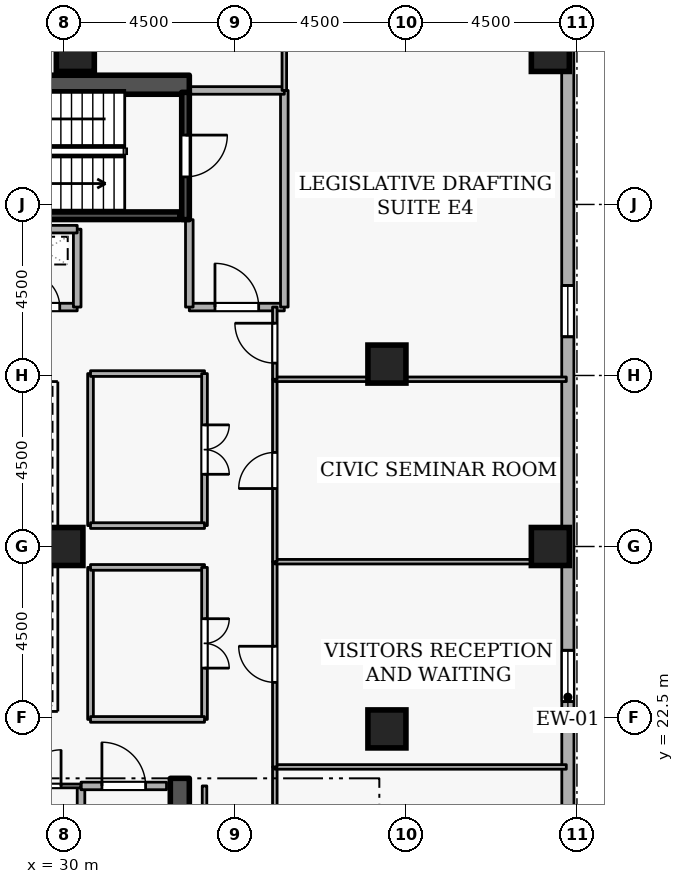
"""IFC4 building model, lengths in metres.
Left out: names, types, materials, properties, quantities, classifications, styles, units other than length and angle.
Written with IfcOpenShell. Run it as: python <this file> out.ifc"""

import sys

from ifc_helpers import new_model, si_unit, direction, frame, frame_2d, origin, origin_2d, place, context, subcontext, project, spatial, rectangle, extrude, element, fill, save


model = new_model("IFC4")
c1 = context("Model", 3, precision=1e-05, world=origin(), true_north=direction((0.0, 1.0)))
c2 = subcontext(c1, "Body", "Model", "MODEL_VIEW")
j1 = project(units=[si_unit("LENGTHUNIT", "METRE"), si_unit("PLANEANGLEUNIT", "RADIAN")], contexts=[c1])
p1 = place(None, origin())
s1 = spatial("IfcSite", under=j1, at=p1, CompositionType="ELEMENT")
p2 = place(p1, origin())
s2 = spatial("IfcBuilding", under=s1, at=p2, CompositionType="ELEMENT")
p3 = place(p2, frame((0.0, 0.0, 251.1)))
s3 = spatial("IfcBuildingStorey", under=s2, at=p3, CompositionType="ELEMENT", Elevation=251.1)
p4 = place(p3, frame((33.05, 15.1, 0.0), z_axis=(0.0, 0.0, 1.0), x_axis=(0.0, 1.0, 0.0)))
e1 = element("IfcWall", 1, at=p4, inside=s3, PredefinedType="SHEAR", context=c2, shape_type="SweptSolid", body=[
    extrude(rectangle(XDim=5.8, YDim=0.5, at=frame_2d((2.9, 0.0))), origin(), (0.0, 0.0, 1.0), 3.6),
])
p5 = place(p3, frame((17.7, 39.15, 0.0), z_axis=(0.0, 0.0, 1.0), x_axis=(1.0, 0.0, 0.0)))
e2 = element("IfcWall", 2, at=p5, inside=s3, PredefinedType="SHEAR", context=c2, shape_type="SweptSolid", body=[
    extrude(rectangle(XDim=15.6, YDim=0.5, at=frame_2d((7.8, 0.0))), origin(), (0.0, 0.0, 1.0), 3.6),
])
for number, where, z_axis, x_axis in (
    (3, (42.8, 27.0, 0.0), (0.0, 0.0, 1.0), (1.0, 0.0, 0.0)),
    (4, (42.8, 40.0, 0.0), (0.0, 0.0, 1.0), (1.0, 0.0, 0.0)),
    (5, (38.5, 22.2, 0.0), (0.0, 0.0, 1.0), (1.0, 0.0, 0.0)),
    (6, (38.5, 31.8, 0.0), (0.0, 0.0, 1.0), (1.0, 0.0, 0.0)),
    (7, (30.3, 40.0, 0.0), (0.0, 0.0, 1.0), (1.0, 0.0, 0.0)),
    (8, (30.0, 27.0, 0.0), (0.0, 0.0, 1.0), (1.0, 0.0, 0.0)),
):
    element("IfcColumn", number, at=place(p3, frame(where, z_axis=z_axis, x_axis=x_axis)), inside=s3, PredefinedType="COLUMN", context=c2, shape_type="SweptSolid", body=[
        extrude(rectangle(XDim=1.0, YDim=1.0, at=origin_2d()), origin(), (0.0, 0.0, 1.0), 3.6),
    ])
p6 = place(p3, frame((43.265, 5.819, 0.0), z_axis=(0.0, 0.0, 1.0), x_axis=(-0.000184351399, 0.999999983007, 0.0)))
e9 = element("IfcWall", 9, at=p6, inside=s3, PredefinedType="STANDARD", context=c2, shape_type="SweptSolid", body=[
    extrude(rectangle(XDim=34.432, YDim=0.32, at=frame_2d((17.216, 0.0))), origin(), (0.0, 0.0, 1.0), 2.22),
])
p7 = place(p6, frame((2.7, 0.0, 0.72)))
e10 = element("IfcOpeningElement", 10, at=p7, cuts=e9, PredefinedType="OPENING", context=c2, shape_type="SweptSolid", body=[
    extrude(rectangle(XDim=1.35, YDim=1.05, at=frame_2d((0.675, 0.525))), frame((0.0, 0.17, 0.0), z_axis=(0.0, -1.0, 0.0), x_axis=(1.0, 0.0, 0.0)), (0.0, 0.0, 1.0), 0.34),
])
p8 = place(p6, frame((12.3, 0.0, 0.72)))
e11 = element("IfcOpeningElement", 11, at=p8, cuts=e9, PredefinedType="OPENING", context=c2, shape_type="SweptSolid", body=[
    extrude(rectangle(XDim=1.35, YDim=1.05, at=frame_2d((0.675, 0.525))), frame((0.0, 0.17, 0.0), z_axis=(0.0, -1.0, 0.0), x_axis=(1.0, 0.0, 0.0)), (0.0, 0.0, 1.0), 0.34),
])
p9 = place(p6, frame((17.1, 0.0, 0.72)))
e12 = element("IfcOpeningElement", 12, at=p9, cuts=e9, PredefinedType="OPENING", context=c2, shape_type="SweptSolid", body=[
    extrude(rectangle(XDim=1.35, YDim=1.05, at=frame_2d((0.675, 0.525))), frame((0.0, 0.17, 0.0), z_axis=(0.0, -1.0, 0.0), x_axis=(1.0, 0.0, 0.0)), (0.0, 0.0, 1.0), 0.34),
])
p10 = place(p6, frame((26.7, 0.0, 0.72)))
e13 = element("IfcOpeningElement", 13, at=p10, cuts=e9, PredefinedType="OPENING", context=c2, shape_type="SweptSolid", body=[
    extrude(rectangle(XDim=1.35, YDim=1.05, at=frame_2d((0.675, 0.525))), frame((0.0, 0.17, 0.0), z_axis=(0.0, -1.0, 0.0), x_axis=(1.0, 0.0, 0.0)), (0.0, 0.0, 1.0), 0.34),
])
p11 = place(p3, frame((33.2, 38.95, 0.0), z_axis=(0.0, 0.0, 1.0), x_axis=(0.0, -1.0, 0.0)))
e14 = element("IfcWall", 14, at=p11, inside=s3, PredefinedType="SHEAR", context=c2, shape_type="SweptSolid", body=[
    extrude(rectangle(XDim=3.35, YDim=0.2, at=frame_2d((1.675, 0.0))), origin(), (0.0, 0.0, 1.0), 3.6),
])
p12 = place(p11, frame((1.125, 0.0, 0.0)))
e15 = element("IfcOpeningElement", 15, at=p12, cuts=e14, PredefinedType="OPENING", context=c2, shape_type="SweptSolid", body=[
    extrude(rectangle(XDim=1.1, YDim=2.1, at=frame_2d((0.55, 1.05))), frame((0.0, 0.11, 0.0), z_axis=(0.0, -1.0, 0.0), x_axis=(1.0, 0.0, 0.0)), (0.0, 0.0, 1.0), 0.22),
])
p13 = place(p3, frame((25.95, 35.703, 0.0), z_axis=(0.0, 0.0, 1.0), x_axis=(1.0, 0.0, 0.0)))
e16 = element("IfcWall", 16, at=p13, inside=s3, PredefinedType="SHEAR", context=c2, shape_type="SweptSolid", body=[
    extrude(rectangle(XDim=7.1, YDim=0.2, at=frame_2d((3.55, 0.0))), origin(), (0.0, 0.0, 1.0), 3.6),
])
p14 = place(p3, frame((33.3, 33.3, 0.0), z_axis=(0.0, 0.0, 1.0), x_axis=(1.0, 0.0, 0.0)))
e17 = element("IfcWall", 17, at=p14, inside=s3, PredefinedType="STANDARD", context=c2, shape_type="SweptSolid", body=[
    extrude(rectangle(XDim=2.5, YDim=0.2, at=frame_2d((1.25, 0.0))), origin(), (0.0, 0.0, 1.0), 3.32),
])
p15 = place(p14, frame((0.675, 0.0, 0.0)))
e18 = element("IfcOpeningElement", 18, at=p15, cuts=e17, PredefinedType="OPENING", context=c2, shape_type="SweptSolid", body=[
    extrude(rectangle(XDim=1.15, YDim=2.1, at=frame_2d((0.575, 1.05))), frame((0.0, 0.11, 0.0), z_axis=(0.0, -1.0, 0.0), x_axis=(1.0, 0.0, 0.0)), (0.0, 0.0, 1.0), 0.22),
])
p16 = place(p3, frame((35.8, 33.3, 0.0), z_axis=(0.0, 0.0, 1.0), x_axis=(0.0, 1.0, 0.0)))
e19 = element("IfcWall", 19, at=p16, inside=s3, PredefinedType="STANDARD", context=c2, shape_type="SweptSolid", body=[
    extrude(rectangle(XDim=5.7, YDim=0.2, at=frame_2d((2.85, 0.0))), origin(), (0.0, 0.0, 1.0), 3.32),
])
p17 = place(p3, frame((35.8, 39.0, 0.0), z_axis=(0.0, 0.0, 1.0), x_axis=(-1.0, 0.0, 0.0)))
e20 = element("IfcWall", 20, at=p17, inside=s3, PredefinedType="STANDARD", context=c2, shape_type="SweptSolid", body=[
    extrude(rectangle(XDim=2.5, YDim=0.2, at=frame_2d((1.25, 0.0))), origin(), (0.0, 0.0, 1.0), 3.32),
])
p18 = place(p3, frame((33.3, 35.6, 0.0), z_axis=(0.0, 0.0, 1.0), x_axis=(0.0, -1.0, 0.0)))
e21 = element("IfcWall", 21, at=p18, inside=s3, PredefinedType="STANDARD", context=c2, shape_type="SweptSolid", body=[
    extrude(rectangle(XDim=2.3, YDim=0.2, at=frame_2d((1.15, 0.0))), origin(), (0.0, 0.0, 1.0), 2.525),
])
p19 = place(p3, frame((28.55, 33.3, 0.0), z_axis=(0.0, 0.0, 1.0), x_axis=(1.0, 0.0, 0.0)))
e22 = element("IfcWall", 22, at=p19, inside=s3, PredefinedType="STANDARD", context=c2, shape_type="SweptSolid", body=[
    extrude(rectangle(XDim=1.8, YDim=0.2, at=frame_2d((0.9, 0.0))), origin(), (0.0, 0.0, 1.0), 3.32),
])
p20 = place(p19, frame((0.46, 0.0, 0.0)))
e23 = element("IfcOpeningElement", 23, at=p20, cuts=e22, PredefinedType="OPENING", context=c2, shape_type="SweptSolid", body=[
    extrude(rectangle(XDim=0.88, YDim=2.04, at=frame_2d((0.44, 1.02))), frame((0.0, 0.11, 0.0), z_axis=(0.0, -1.0, 0.0), x_axis=(1.0, 0.0, 0.0)), (0.0, 0.0, 1.0), 0.22),
])
p21 = place(p3, frame((30.35, 33.3, 0.0), z_axis=(0.0, 0.0, 1.0), x_axis=(0.0, 1.0, 0.0)))
e24 = element("IfcWall", 24, at=p21, inside=s3, PredefinedType="STANDARD", context=c2, shape_type="SweptSolid", body=[
    extrude(rectangle(XDim=2.05, YDim=0.2, at=frame_2d((1.025, 0.0))), origin(), (0.0, 0.0, 1.0), 3.32),
])
p22 = place(p3, frame((30.35, 35.35, 0.0), z_axis=(0.0, 0.0, 1.0), x_axis=(-1.0, 0.0, 0.0)))
e25 = element("IfcWall", 25, at=p22, inside=s3, PredefinedType="STANDARD", context=c2, shape_type="SweptSolid", body=[
    extrude(rectangle(XDim=1.8, YDim=0.2, at=frame_2d((0.9, 0.0))), origin(), (0.0, 0.0, 1.0), 3.32),
])
p23 = place(p3, frame((30.45, 18.65, 0.0), z_axis=(0.0, 0.0, 1.0), x_axis=(0.0, 1.0, 0.0)))
e26 = element("IfcWall", 26, at=p23, inside=s3, PredefinedType="STANDARD", context=c2, shape_type="SweptSolid", body=[
    extrude(rectangle(XDim=2.05, YDim=0.2, at=frame_2d((1.025, 0.0))), origin(), (0.0, 0.0, 1.0), 3.32),
])
p24 = place(p3, frame((30.45, 20.7, 0.0), z_axis=(0.0, 0.0, 1.0), x_axis=(1.0, 0.0, 0.0)))
e27 = element("IfcWall", 27, at=p24, inside=s3, PredefinedType="STANDARD", context=c2, shape_type="SweptSolid", body=[
    extrude(rectangle(XDim=2.25, YDim=0.2, at=frame_2d((1.125, 0.0))), origin(), (0.0, 0.0, 1.0), 3.32),
])
p25 = place(p24, frame((0.55, 0.0, 0.0)))
e28 = element("IfcOpeningElement", 28, at=p25, cuts=e27, PredefinedType="OPENING", context=c2, shape_type="SweptSolid", body=[
    extrude(rectangle(XDim=1.15, YDim=2.1, at=frame_2d((0.575, 1.05))), frame((0.0, 0.11, 0.0), z_axis=(0.0, -1.0, 0.0), x_axis=(1.0, 0.0, 0.0)), (0.0, 0.0, 1.0), 0.22),
])
p26 = place(p3, frame((28.45, 20.7, 0.0), z_axis=(0.0, 0.0, 1.0), x_axis=(1.0, 0.0, 0.0)))
e29 = element("IfcWall", 29, at=p26, inside=s3, PredefinedType="PARTITIONING", context=c2, shape_type="SweptSolid", body=[
    extrude(rectangle(XDim=2.0, YDim=0.1, at=frame_2d((1.0, 0.0))), origin(), (0.0, 0.0, 1.0), 3.32),
])
p27 = place(p26, frame((0.525, 0.0, 0.0)))
e30 = element("IfcOpeningElement", 30, at=p27, cuts=e29, PredefinedType="OPENING", context=c2, shape_type="SweptSolid", body=[
    extrude(rectangle(XDim=0.95, YDim=2.1, at=frame_2d((0.475, 1.05))), frame((0.0, 0.06, 0.0), z_axis=(0.0, -1.0, 0.0), x_axis=(1.0, 0.0, 0.0)), (0.0, 0.0, 1.0), 0.12),
])
p28 = place(p3, frame((33.7, 20.7, 0.0), z_axis=(0.0, 0.0, 1.0), x_axis=(0.0, -1.0, 0.0)))
e31 = element("IfcWall", 31, at=p28, inside=s3, PredefinedType="PARTITIONING", context=c2, shape_type="SweptSolid", body=[
    extrude(rectangle(XDim=5.9, YDim=0.12, at=frame_2d((2.95, 0.0))), origin(), (0.0, 0.0, 1.0), 3.32),
])
p29 = place(p3, frame((35.55, 14.8, 0.0), z_axis=(0.0, 0.0, 1.0), x_axis=(0.0, 1.0, 0.0)))
e32 = element("IfcWall", 32, at=p29, inside=s3, PredefinedType="PARTITIONING", context=c2, shape_type="SweptSolid", body=[
    extrude(rectangle(XDim=6.4, YDim=0.12, at=frame_2d((3.2, 0.0))), origin(), (0.0, 0.0, 1.0), 3.32),
])
p30 = place(p29, frame((2.675, 0.0, 0.0)))
e33 = element("IfcOpeningElement", 33, at=p30, cuts=e32, PredefinedType="OPENING", context=c2, shape_type="SweptSolid", body=[
    extrude(rectangle(XDim=1.05, YDim=2.1, at=frame_2d((0.525, 1.05))), frame((0.0, 0.07, 0.0), z_axis=(0.0, -1.0, 0.0), x_axis=(1.0, 0.0, 0.0)), (0.0, 0.0, 1.0), 0.14),
])
p31 = place(p3, frame((35.55, 21.2, 0.0), z_axis=(0.0, 0.0, 1.0), x_axis=(1.0, 0.0, 0.0)))
e34 = element("IfcWall", 34, at=p31, inside=s3, PredefinedType="PARTITIONING", context=c2, shape_type="SweptSolid", body=[
    extrude(rectangle(XDim=7.67, YDim=0.12, at=frame_2d((3.835, 0.0))), origin(), (0.0, 0.0, 1.0), 3.32),
])
p32 = place(p3, frame((35.55, 21.2, 0.0), z_axis=(0.0, 0.0, 1.0), x_axis=(0.0, 1.0, 0.0)))
e35 = element("IfcWall", 35, at=p32, inside=s3, PredefinedType="PARTITIONING", context=c2, shape_type="SweptSolid", body=[
    extrude(rectangle(XDim=5.4, YDim=0.12, at=frame_2d((2.7, 0.0))), origin(), (0.0, 0.0, 1.0), 3.32),
])
p33 = place(p32, frame((2.225, 0.0, 0.0)))
e36 = element("IfcOpeningElement", 36, at=p33, cuts=e35, PredefinedType="OPENING", context=c2, shape_type="SweptSolid", body=[
    extrude(rectangle(XDim=0.95, YDim=2.1, at=frame_2d((0.475, 1.05))), frame((0.0, 0.07, 0.0), z_axis=(0.0, -1.0, 0.0), x_axis=(1.0, 0.0, 0.0)), (0.0, 0.0, 1.0), 0.14),
])
p34 = place(p3, frame((35.55, 26.6, 0.0), z_axis=(0.0, 0.0, 1.0), x_axis=(1.0, 0.0, 0.0)))
e37 = element("IfcWall", 37, at=p34, inside=s3, PredefinedType="PARTITIONING", context=c2, shape_type="SweptSolid", body=[
    extrude(rectangle(XDim=7.67, YDim=0.12, at=frame_2d((3.835, 0.0))), origin(), (0.0, 0.0, 1.0), 1.785),
])
p35 = place(p3, frame((35.55, 26.6, 0.0), z_axis=(0.0, 0.0, 1.0), x_axis=(0.0, 1.0, 0.0)))
e38 = element("IfcWall", 38, at=p35, inside=s3, PredefinedType="PARTITIONING", context=c2, shape_type="SweptSolid", body=[
    extrude(rectangle(XDim=4.8, YDim=0.12, at=frame_2d((2.4, 0.0))), origin(), (0.0, 0.0, 1.0), 3.32),
])
p36 = place(p35, frame((1.925, 0.0, 0.0)))
e39 = element("IfcOpeningElement", 39, at=p36, cuts=e38, PredefinedType="OPENING", context=c2, shape_type="SweptSolid", body=[
    extrude(rectangle(XDim=0.95, YDim=2.1, at=frame_2d((0.475, 1.05))), frame((0.0, 0.07, 0.0), z_axis=(0.0, -1.0, 0.0), x_axis=(1.0, 0.0, 0.0)), (0.0, 0.0, 1.0), 0.14),
])
p37 = place(p3, frame((35.55, 31.4, 0.0), z_axis=(0.0, 0.0, 1.0), x_axis=(1.0, 0.0, 0.0)))
e40 = element("IfcWall", 40, at=p37, inside=s3, PredefinedType="PARTITIONING", context=c2, shape_type="SweptSolid", body=[
    extrude(rectangle(XDim=7.67, YDim=0.12, at=frame_2d((3.835, 0.0))), origin(), (0.0, 0.0, 1.0), 3.32),
])
p38 = place(p3, frame((35.8, 39.0, 0.0), z_axis=(0.0, 0.0, 1.0), x_axis=(0.0, 1.0, 0.0)))
e41 = element("IfcWall", 41, at=p38, inside=s3, PredefinedType="PARTITIONING", context=c2, shape_type="SweptSolid", body=[
    extrude(rectangle(XDim=5.72, YDim=0.12, at=frame_2d((2.86, 0.0))), origin(), (0.0, 0.0, 1.0), 3.32),
])
p39 = place(p3, frame((35.55, 31.4, 0.0), z_axis=(0.0, 0.0, 1.0), x_axis=(0.0, 1.0, 0.0)))
e42 = element("IfcWall", 42, at=p39, inside=s3, PredefinedType="PARTITIONING", context=c2, shape_type="SweptSolid", body=[
    extrude(rectangle(XDim=1.9, YDim=0.12, at=frame_2d((0.95, 0.0))), origin(), (0.0, 0.0, 1.0), 3.32),
])
p40 = place(p39, frame((0.425, 0.0, 0.0)))
e43 = element("IfcOpeningElement", 43, at=p40, cuts=e42, PredefinedType="OPENING", context=c2, shape_type="SweptSolid", body=[
    extrude(rectangle(XDim=1.05, YDim=2.1, at=frame_2d((0.525, 1.05))), frame((0.0, 0.07, 0.0), z_axis=(0.0, -1.0, 0.0), x_axis=(1.0, 0.0, 0.0)), (0.0, 0.0, 1.0), 0.14),
])
p41 = place(p3, frame((30.7, 22.45, 0.0), z_axis=(0.0, 0.0, 1.0), x_axis=(0.0, 1.0, 0.0)))
e44 = element("IfcWall", 44, at=p41, inside=s3, PredefinedType="PARTITIONING", context=c2, shape_type="SweptSolid", body=[
    extrude(rectangle(XDim=4.0, YDim=0.15, at=frame_2d((2.0, 0.0))), origin(), (0.0, 0.0, 1.0), 3.32),
])
p42 = place(p3, frame((30.7, 26.45, 0.0), z_axis=(0.0, 0.0, 1.0), x_axis=(1.0, 0.0, 0.0)))
e45 = element("IfcWall", 45, at=p42, inside=s3, PredefinedType="PARTITIONING", context=c2, shape_type="SweptSolid", body=[
    extrude(rectangle(XDim=3.0, YDim=0.15, at=frame_2d((1.5, 0.0))), origin(), (0.0, 0.0, 1.0), 1.785),
])
p43 = place(p3, frame((33.7, 26.45, 0.0), z_axis=(0.0, 0.0, 1.0), x_axis=(0.0, -1.0, 0.0)))
e46 = element("IfcWall", 46, at=p43, inside=s3, PredefinedType="PARTITIONING", context=c2, shape_type="SweptSolid", body=[
    extrude(rectangle(XDim=4.0, YDim=0.15, at=frame_2d((2.0, 0.0))), origin(), (0.0, 0.0, 1.0), 3.32),
])
p44 = place(p43, frame((1.35, 0.0, 0.0)))
e47 = element("IfcOpeningElement", 47, at=p44, cuts=e46, PredefinedType="OPENING", context=c2, shape_type="SweptSolid", body=[
    extrude(rectangle(XDim=1.3, YDim=2.12, at=frame_2d((0.65, 1.06))), frame((0.0, 0.085, 0.0), z_axis=(0.0, -1.0, 0.0), x_axis=(1.0, 0.0, 0.0)), (0.0, 0.0, 1.0), 0.17),
])
p45 = place(p3, frame((33.7, 22.45, 0.0), z_axis=(0.0, 0.0, 1.0), x_axis=(-1.0, 0.0, 0.0)))
e48 = element("IfcWall", 48, at=p45, inside=s3, PredefinedType="PARTITIONING", context=c2, shape_type="SweptSolid", body=[
    extrude(rectangle(XDim=3.0, YDim=0.15, at=frame_2d((1.5, 0.0))), origin(), (0.0, 0.0, 1.0), 3.32),
])
p46 = place(p3, frame((30.7, 27.55, 0.0), z_axis=(0.0, 0.0, 1.0), x_axis=(0.0, 1.0, 0.0)))
e49 = element("IfcWall", 49, at=p46, inside=s3, PredefinedType="PARTITIONING", context=c2, shape_type="SweptSolid", body=[
    extrude(rectangle(XDim=4.0, YDim=0.15, at=frame_2d((2.0, 0.0))), origin(), (0.0, 0.0, 1.0), 3.32),
])
p47 = place(p3, frame((30.7, 31.55, 0.0), z_axis=(0.0, 0.0, 1.0), x_axis=(1.0, 0.0, 0.0)))
e50 = element("IfcWall", 50, at=p47, inside=s3, PredefinedType="PARTITIONING", context=c2, shape_type="SweptSolid", body=[
    extrude(rectangle(XDim=3.0, YDim=0.15, at=frame_2d((1.5, 0.0))), origin(), (0.0, 0.0, 1.0), 3.32),
])
p48 = place(p3, frame((33.7, 31.55, 0.0), z_axis=(0.0, 0.0, 1.0), x_axis=(0.0, -1.0, 0.0)))
e51 = element("IfcWall", 51, at=p48, inside=s3, PredefinedType="PARTITIONING", context=c2, shape_type="SweptSolid", body=[
    extrude(rectangle(XDim=4.0, YDim=0.15, at=frame_2d((2.0, 0.0))), origin(), (0.0, 0.0, 1.0), 3.32),
])
p49 = place(p48, frame((1.35, 0.0, 0.0)))
e52 = element("IfcOpeningElement", 52, at=p49, cuts=e51, PredefinedType="OPENING", context=c2, shape_type="SweptSolid", body=[
    extrude(rectangle(XDim=1.3, YDim=2.12, at=frame_2d((0.65, 1.06))), frame((0.0, 0.085, 0.0), z_axis=(0.0, -1.0, 0.0), x_axis=(1.0, 0.0, 0.0)), (0.0, 0.0, 1.0), 0.17),
])
p50 = place(p3, frame((33.7, 27.55, 0.0), z_axis=(0.0, 0.0, 1.0), x_axis=(-1.0, 0.0, 0.0)))
e53 = element("IfcWall", 53, at=p50, inside=s3, PredefinedType="PARTITIONING", context=c2, shape_type="SweptSolid", body=[
    extrude(rectangle(XDim=3.0, YDim=0.15, at=frame_2d((1.5, 0.0))), origin(), (0.0, 0.0, 1.0), 1.785),
])
p51 = place(p9, origin())
e54 = element("IfcWindow", 54, at=p51, inside=s3, PartitioningType="SINGLE_PANEL", PredefinedType="WINDOW", context=c2, shape_type="SweptSolid", body=[
    extrude(rectangle(XDim=1.35, YDim=1.05, at=frame_2d((0.675, 0.525))), frame((0.0, 0.03, 0.0), z_axis=(0.0, -1.0, 0.0), x_axis=(1.0, 0.0, 0.0)), (0.0, 0.0, 1.0), 0.06),
])
fill(e12, e54)
p52 = place(p10, origin())
e55 = element("IfcWindow", 55, at=p52, inside=s3, PartitioningType="SINGLE_PANEL", PredefinedType="WINDOW", context=c2, shape_type="SweptSolid", body=[
    extrude(rectangle(XDim=1.35, YDim=1.05, at=frame_2d((0.675, 0.525))), frame((0.0, 0.03, 0.0), z_axis=(0.0, -1.0, 0.0), x_axis=(1.0, 0.0, 0.0)), (0.0, 0.0, 1.0), 0.06),
])
fill(e13, e55)
p53 = place(p12, origin())
e56 = element("IfcDoor", 56, at=p53, inside=s3, OperationType="SINGLE_SWING_LEFT", PredefinedType="DOOR", context=c2, shape_type="SweptSolid", body=[
    extrude(rectangle(XDim=1.1, YDim=2.1, at=frame_2d((0.55, 1.05))), frame((0.0, 0.025, 0.0), z_axis=(0.0, -1.0, 0.0), x_axis=(1.0, 0.0, 0.0)), (0.0, 0.0, 1.0), 0.05),
])
fill(e15, e56)
p54 = place(p15, origin())
e57 = element("IfcDoor", 57, at=p54, inside=s3, OperationType="SINGLE_SWING_LEFT", PredefinedType="DOOR", context=c2, shape_type="SweptSolid", body=[
    extrude(rectangle(XDim=1.15, YDim=2.1, at=frame_2d((0.575, 1.05))), frame((0.0, 0.025, 0.0), z_axis=(0.0, -1.0, 0.0), x_axis=(1.0, 0.0, 0.0)), (0.0, 0.0, 1.0), 0.05),
])
fill(e18, e57)
p55 = place(p20, origin())
e58 = element("IfcDoor", 58, at=p55, inside=s3, OperationType="SINGLE_SWING_LEFT", PredefinedType="DOOR", context=c2, shape_type="SweptSolid", body=[
    extrude(rectangle(XDim=0.88, YDim=2.04, at=frame_2d((0.44, 1.02))), frame((0.0, 0.025, 0.0), z_axis=(0.0, -1.0, 0.0), x_axis=(1.0, 0.0, 0.0)), (0.0, 0.0, 1.0), 0.05),
])
fill(e23, e58)
p56 = place(p27, origin())
e59 = element("IfcDoor", 59, at=p56, inside=s3, OperationType="SINGLE_SWING_RIGHT", PredefinedType="DOOR", context=c2, shape_type="SweptSolid", body=[
    extrude(rectangle(XDim=0.95, YDim=2.1, at=frame_2d((0.475, 1.05))), frame((0.0, 0.025, 0.0), z_axis=(0.0, -1.0, 0.0), x_axis=(1.0, 0.0, 0.0)), (0.0, 0.0, 1.0), 0.05),
])
fill(e30, e59)
p57 = place(p25, origin())
e60 = element("IfcDoor", 60, at=p57, inside=s3, OperationType="SINGLE_SWING_LEFT", PredefinedType="DOOR", context=c2, shape_type="SweptSolid", body=[
    extrude(rectangle(XDim=1.15, YDim=2.1, at=frame_2d((0.575, 1.05))), frame((0.0, 0.025, 0.0), z_axis=(0.0, -1.0, 0.0), x_axis=(1.0, 0.0, 0.0)), (0.0, 0.0, 1.0), 0.05),
])
fill(e28, e60)
p58 = place(p33, origin())
e61 = element("IfcDoor", 61, at=p58, inside=s3, OperationType="SINGLE_SWING_RIGHT", PredefinedType="DOOR", context=c2, shape_type="SweptSolid", body=[
    extrude(rectangle(XDim=0.95, YDim=2.1, at=frame_2d((0.475, 1.05))), frame((0.0, 0.025, 0.0), z_axis=(0.0, -1.0, 0.0), x_axis=(1.0, 0.0, 0.0)), (0.0, 0.0, 1.0), 0.05),
])
fill(e36, e61)
p59 = place(p36, origin())
e62 = element("IfcDoor", 62, at=p59, inside=s3, OperationType="SINGLE_SWING_LEFT", PredefinedType="DOOR", context=c2, shape_type="SweptSolid", body=[
    extrude(rectangle(XDim=0.95, YDim=2.1, at=frame_2d((0.475, 1.05))), frame((0.0, 0.025, 0.0), z_axis=(0.0, -1.0, 0.0), x_axis=(1.0, 0.0, 0.0)), (0.0, 0.0, 1.0), 0.05),
])
fill(e39, e62)
p60 = place(p40, origin())
e63 = element("IfcDoor", 63, at=p60, inside=s3, OperationType="SINGLE_SWING_RIGHT", PredefinedType="DOOR", context=c2, shape_type="SweptSolid", body=[
    extrude(rectangle(XDim=1.05, YDim=2.1, at=frame_2d((0.525, 1.05))), frame((0.0, 0.025, 0.0), z_axis=(0.0, -1.0, 0.0), x_axis=(1.0, 0.0, 0.0)), (0.0, 0.0, 1.0), 0.05),
])
fill(e43, e63)
p61 = place(p44, origin())
e64 = element("IfcDoor", 64, at=p61, inside=s3, OperationType="DOUBLE_DOOR_SINGLE_SWING", PredefinedType="DOOR", context=c2, shape_type="SweptSolid", body=[
    extrude(rectangle(XDim=1.3, YDim=2.12, at=frame_2d((0.65, 1.06))), frame((0.0, 0.025, 0.0), z_axis=(0.0, -1.0, 0.0), x_axis=(1.0, 0.0, 0.0)), (0.0, 0.0, 1.0), 0.05),
])
fill(e47, e64)
p62 = place(p49, origin())
e65 = element("IfcDoor", 65, at=p62, inside=s3, OperationType="DOUBLE_DOOR_SINGLE_SWING", PredefinedType="DOOR", context=c2, shape_type="SweptSolid", body=[
    extrude(rectangle(XDim=1.3, YDim=2.12, at=frame_2d((0.65, 1.06))), frame((0.0, 0.025, 0.0), z_axis=(0.0, -1.0, 0.0), x_axis=(1.0, 0.0, 0.0)), (0.0, 0.0, 1.0), 0.05),
])
fill(e52, e65)
save(model, sys.argv[1])
